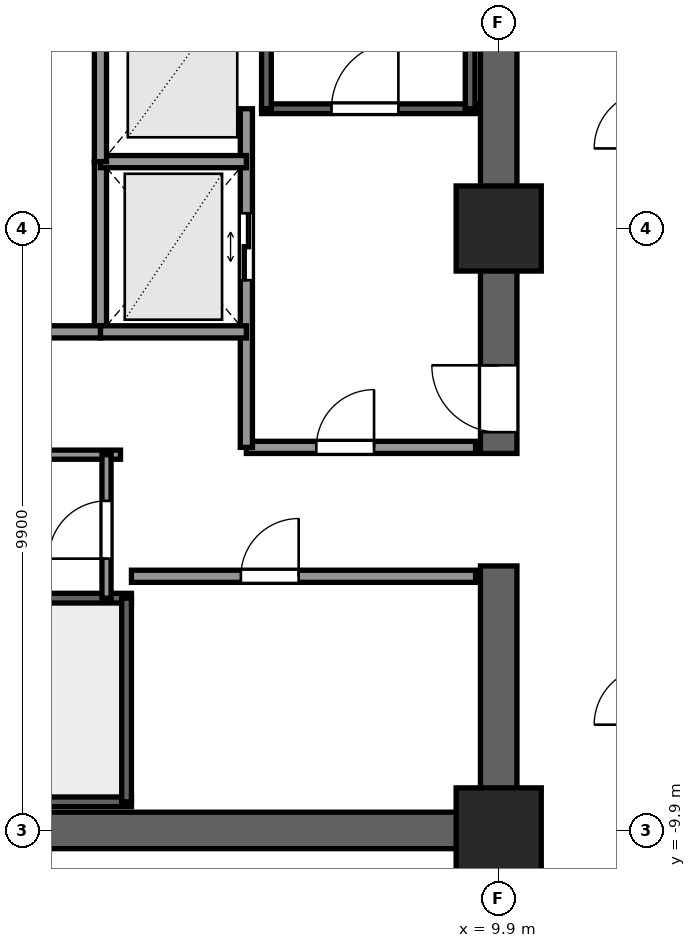
"""IFC4 building model, lengths in metres.
Left out: names, types, materials, properties, quantities, classifications, styles, units other than length and angle.
Written with IfcOpenShell. Run it as: python <this file> out.ifc"""

import sys

from ifc_helpers import new_model, si_unit, direction, frame, frame_2d, origin, origin_2d, place, context, subcontext, project, spatial, rectangle, extrude, element, fill, save


model = new_model("IFC4")
c1 = context("Model", 3, precision=1e-05, world=origin(), true_north=direction((0.0, 1.0)))
c2 = subcontext(c1, "Body", "Model", "MODEL_VIEW")
j1 = project(units=[si_unit("LENGTHUNIT", "METRE"), si_unit("PLANEANGLEUNIT", "RADIAN")], contexts=[c1])
p1 = place(None, origin())
s1 = spatial("IfcSite", under=j1, at=p1, CompositionType="ELEMENT")
p2 = place(p1, origin())
s2 = spatial("IfcBuilding", under=s1, at=p2, CompositionType="ELEMENT")
p3 = place(p2, frame((0.0, 0.0, 23.8)))
s3 = spatial("IfcBuildingStorey", under=s2, at=p3, CompositionType="ELEMENT", Elevation=23.8)
p4 = place(p3, frame((10.2, -9.9, 0.0), z_axis=(0.0, 0.0, 1.0), x_axis=(-1.0, 0.0, 0.0)))
e1 = element("IfcWall", 1, at=p4, inside=s3, PredefinedType="SHEAR", context=c2, shape_type="SweptSolid", body=[
    extrude(rectangle(XDim=12.06, YDim=0.6, at=frame_2d((6.03, 0.0))), origin(), (0.0, 0.0, 1.0), 3.3),
])
p5 = place(p3, frame((9.9, -9.6, 0.0), z_axis=(0.0, 0.0, 1.0), x_axis=(0.0, 1.0, 0.0)))
e2 = element("IfcWall", 2, at=p5, inside=s3, PredefinedType="SHEAR", context=c2, shape_type="SweptSolid", body=[
    extrude(rectangle(XDim=4.05, YDim=0.6, at=frame_2d((2.025, 0.0))), origin(), (0.0, 0.0, 1.0), 3.3),
])
p6 = place(p3, frame((9.9, -3.7, 0.0), z_axis=(0.0, 0.0, 1.0), x_axis=(0.0, 1.0, 0.0)))
e3 = element("IfcWall", 3, at=p6, inside=s3, PredefinedType="SHEAR", context=c2, shape_type="SweptSolid", body=[
    extrude(rectangle(XDim=13.3, YDim=0.6, at=frame_2d((6.65, 0.0))), origin(), (0.0, 0.0, 1.0), 3.3),
])
p7 = place(p6, frame((0.35, 0.0, 0.0)))
e4 = element("IfcOpeningElement", 4, at=p7, cuts=e3, PredefinedType="OPENING", context=c2, shape_type="SweptSolid", body=[
    extrude(rectangle(XDim=1.1, YDim=2.2, at=frame_2d((0.55, 1.1))), frame((0.0, 0.31, 0.0), z_axis=(0.0, -1.0, 0.0), x_axis=(1.0, 0.0, 0.0)), (0.0, 0.0, 1.0), 0.62),
])
for number, where, z_axis, x_axis in (
    (5, (9.9, -9.9, 0.0), (0.0, 0.0, 1.0), (1.0, 0.0, 0.0)),
    (6, (9.9, 0.0, 0.0), (0.0, 0.0, 1.0), (1.0, 0.0, 0.0)),
):
    element("IfcColumn", number, at=place(p3, frame(where, z_axis=z_axis, x_axis=x_axis)), inside=s3, PredefinedType="COLUMN", context=c2, shape_type="SweptSolid", body=[
        extrude(rectangle(XDim=1.4, YDim=1.4, at=origin_2d()), origin(), (0.0, 0.0, 1.0), 3.3),
    ])
p8 = place(p3, frame((6.0, 1.97, 0.0), z_axis=(0.0, 0.0, 1.0), x_axis=(1.0, 0.0, 0.0)))
e7 = element("IfcWall", 7, at=p8, inside=s3, PredefinedType="SHEAR", context=c2, shape_type="SweptSolid", body=[
    extrude(rectangle(XDim=3.52, YDim=0.16, at=frame_2d((1.76, 0.0))), origin(), (0.0, 0.0, 1.0), 3.3),
])
p9 = place(p8, frame((1.15, 0.0, 0.0)))
e8 = element("IfcOpeningElement", 8, at=p9, cuts=e7, PredefinedType="OPENING", context=c2, shape_type="SweptSolid", body=[
    extrude(rectangle(XDim=1.1, YDim=2.2, at=frame_2d((0.55, 1.1))), frame((0.0, 0.09, 0.0), z_axis=(0.0, -1.0, 0.0), x_axis=(1.0, 0.0, 0.0)), (0.0, 0.0, 1.0), 0.18),
])
for number, where, z_axis, x_axis in (
    (9, (6.08, 1.97, 0.0), (0.0, 0.0, 1.0), (0.0, 1.0, 0.0)),
    (10, (9.43, 1.97, 0.0), (0.0, 0.0, 1.0), (0.0, 1.0, 0.0)),
):
    element("IfcWall", number, at=place(p3, frame(where, z_axis=z_axis, x_axis=x_axis)), inside=s3, PredefinedType="SHEAR", context=c2, shape_type="SweptSolid", body=[
        extrude(rectangle(XDim=7.56, YDim=0.16, at=frame_2d((3.78, 0.0))), origin(), (0.0, 0.0, 1.0), 3.3),
    ])
p10 = place(p3, frame((3.86, -9.43, 0.0), z_axis=(0.0, 0.0, 1.0), x_axis=(-1.0, 0.0, 0.0)))
e11 = element("IfcWall", 11, at=p10, inside=s3, PredefinedType="SHEAR", context=c2, shape_type="SweptSolid", body=[
    extrude(rectangle(XDim=7.72, YDim=0.16, at=frame_2d((3.86, 0.0))), origin(), (0.0, 0.0, 1.0), 3.3),
])
p11 = place(p10, frame((6.01, 0.0, 0.0)))
e12 = element("IfcOpeningElement", 12, at=p11, cuts=e11, PredefinedType="OPENING", context=c2, shape_type="SweptSolid", body=[
    extrude(rectangle(XDim=1.1, YDim=2.2, at=frame_2d((0.55, 1.1))), frame((0.0, 0.09, 0.0), z_axis=(0.0, -1.0, 0.0), x_axis=(1.0, 0.0, 0.0)), (0.0, 0.0, 1.0), 0.18),
])
p12 = place(p3, frame((-3.86, -6.08, 0.0), z_axis=(0.0, 0.0, 1.0), x_axis=(1.0, 0.0, 0.0)))
e13 = element("IfcWall", 13, at=p12, inside=s3, PredefinedType="SHEAR", context=c2, shape_type="SweptSolid", body=[
    extrude(rectangle(XDim=7.72, YDim=0.16, at=frame_2d((3.86, 0.0))), origin(), (0.0, 0.0, 1.0), 3.3),
])
p13 = place(p3, frame((3.78, -9.43, 0.0), z_axis=(0.0, 0.0, 1.0), x_axis=(0.0, 1.0, 0.0)))
e14 = element("IfcWall", 14, at=p13, inside=s3, PredefinedType="SHEAR", context=c2, shape_type="SweptSolid", body=[
    extrude(rectangle(XDim=3.35, YDim=0.16, at=frame_2d((1.675, 0.0))), origin(), (0.0, 0.0, 1.0), 3.3),
])
p14 = place(p3, frame((5.75, -3.6, 0.0), z_axis=(0.0, 0.0, 1.0), x_axis=(1.0, 0.0, 0.0)))
e15 = element("IfcWall", 15, at=p14, inside=s3, PredefinedType="SOLIDWALL", context=c2, shape_type="SweptSolid", body=[
    extrude(rectangle(XDim=3.77, YDim=0.2, at=frame_2d((1.885, 0.0))), origin(), (0.0, 0.0, 1.0), 3.06),
])
p15 = place(p14, frame((1.15, 0.0, 0.0)))
e16 = element("IfcOpeningElement", 16, at=p15, cuts=e15, PredefinedType="OPENING", context=c2, shape_type="SweptSolid", body=[
    extrude(rectangle(XDim=0.95, YDim=2.06, at=frame_2d((0.475, 1.03))), frame((0.0, 0.11, 0.0), z_axis=(0.0, -1.0, 0.0), x_axis=(1.0, 0.0, 0.0)), (0.0, 0.0, 1.0), 0.22),
])
p16 = place(p3, frame((5.75, -3.6, 0.0), z_axis=(0.0, 0.0, 1.0), x_axis=(0.0, 1.0, 0.0)))
e17 = element("IfcWall", 17, at=p16, inside=s3, PredefinedType="SOLIDWALL", context=c2, shape_type="SweptSolid", body=[
    extrude(rectangle(XDim=5.57, YDim=0.2, at=frame_2d((2.785, 0.0))), origin(), (0.0, 0.0, 1.0), 3.06),
])
p17 = place(p16, frame((2.75, 0.0, 0.0)))
e18 = element("IfcOpeningElement", 18, at=p17, cuts=e17, PredefinedType="OPENING", context=c2, shape_type="SweptSolid", body=[
    extrude(rectangle(XDim=1.1, YDim=2.2, at=frame_2d((0.55, 1.1))), frame((0.0, 0.11, 0.0), z_axis=(0.0, -1.0, 0.0), x_axis=(1.0, 0.0, 0.0)), (0.0, 0.0, 1.0), 0.22),
])
p18 = place(p3, frame((3.35, -1.7, 0.0), z_axis=(0.0, 0.0, 1.0), x_axis=(0.0, 1.0, 0.0)))
e19 = element("IfcWall", 19, at=p18, inside=s3, PredefinedType="SOLIDWALL", context=c2, shape_type="SweptSolid", body=[
    extrude(rectangle(XDim=2.8, YDim=0.2, at=frame_2d((1.4, 0.0))), origin(), (0.0, 0.0, 1.0), 3.06),
])
for number, where, z_axis, x_axis in (
    (20, (3.35, -1.7, 0.0), (0.0, 0.0, 1.0), (1.0, 0.0, 0.0)),
    (21, (3.35, 1.1, 0.0), (0.0, 0.0, 1.0), (1.0, 0.0, 0.0)),
):
    element("IfcWall", number, at=place(p3, frame(where, z_axis=z_axis, x_axis=x_axis)), inside=s3, PredefinedType="SOLIDWALL", context=c2, shape_type="SweptSolid", body=[
        extrude(rectangle(XDim=2.4, YDim=0.2, at=frame_2d((1.2, 0.0))), origin(), (0.0, 0.0, 1.0), 3.06),
    ])
p19 = place(p3, frame((3.86, -5.72, 0.0), z_axis=(0.0, 0.0, 1.0), x_axis=(1.0, 0.0, 0.0)))
e22 = element("IfcWall", 22, at=p19, inside=s3, PredefinedType="SOLIDWALL", context=c2, shape_type="SweptSolid", body=[
    extrude(rectangle(XDim=5.66, YDim=0.2, at=frame_2d((2.83, 0.0))), origin(), (0.0, 0.0, 1.0), 3.06),
])
p20 = place(p19, frame((1.8, 0.0, 0.0)))
e23 = element("IfcOpeningElement", 23, at=p20, cuts=e22, PredefinedType="OPENING", context=c2, shape_type="SweptSolid", body=[
    extrude(rectangle(XDim=0.95, YDim=2.06, at=frame_2d((0.475, 1.03))), frame((0.0, 0.11, 0.0), z_axis=(0.0, -1.0, 0.0), x_axis=(1.0, 0.0, 0.0)), (0.0, 0.0, 1.0), 0.22),
])
p21 = place(p3, frame((-3.35, -1.7, 0.0), z_axis=(0.0, 0.0, 1.0), x_axis=(1.0, 0.0, 0.0)))
e24 = element("IfcWall", 24, at=p21, inside=s3, PredefinedType="SOLIDWALL", context=c2, shape_type="SweptSolid", body=[
    extrude(rectangle(XDim=6.7, YDim=0.2, at=frame_2d((3.35, 0.0))), origin(), (0.0, 0.0, 1.0), 3.06),
])
p22 = place(p3, frame((3.35, 1.1, 0.0), z_axis=(0.0, 0.0, 1.0), x_axis=(0.0, 1.0, 0.0)))
e25 = element("IfcWall", 25, at=p22, inside=s3, PredefinedType="SOLIDWALL", context=c2, shape_type="SweptSolid", body=[
    extrude(rectangle(XDim=3.2, YDim=0.2, at=frame_2d((1.6, 0.0))), origin(), (0.0, 0.0, 1.0), 3.06),
])
p23 = place(p3, frame((-3.68, -3.72, 0.0), z_axis=(0.0, 0.0, 1.0), x_axis=(1.0, 0.0, 0.0)))
e26 = element("IfcWall", 26, at=p23, inside=s3, PredefinedType="PARTITIONING", context=c2, shape_type="SweptSolid", body=[
    extrude(rectangle(XDim=7.36, YDim=0.15, at=frame_2d((3.68, 0.0))), origin(), (0.0, 0.0, 1.0), 3.06),
])
p24 = place(p3, frame((3.45, -6.08, 0.0), z_axis=(0.0, 0.0, 1.0), x_axis=(0.0, 1.0, 0.0)))
e27 = element("IfcWall", 27, at=p24, inside=s3, PredefinedType="PARTITIONING", context=c2, shape_type="SweptSolid", body=[
    extrude(rectangle(XDim=2.36, YDim=0.15, at=frame_2d((1.18, 0.0))), origin(), (0.0, 0.0, 1.0), 3.06),
])
p25 = place(p24, frame((0.65, 0.0, 0.0)))
e28 = element("IfcOpeningElement", 28, at=p25, cuts=e27, PredefinedType="OPENING", context=c2, shape_type="SweptSolid", body=[
    extrude(rectangle(XDim=0.95, YDim=2.06, at=frame_2d((0.475, 1.03))), frame((0.0, 0.085, 0.0), z_axis=(0.0, -1.0, 0.0), x_axis=(1.0, 0.0, 0.0)), (0.0, 0.0, 1.0), 0.17),
])
p26 = place(p9, origin())
e29 = element("IfcDoor", 29, at=p26, inside=s3, OperationType="SINGLE_SWING_RIGHT", PredefinedType="DOOR", context=c2, shape_type="SweptSolid", body=[
    extrude(rectangle(XDim=1.1, YDim=2.2, at=frame_2d((0.55, 1.1))), frame((0.0, 0.025, 0.0), z_axis=(0.0, -1.0, 0.0), x_axis=(1.0, 0.0, 0.0)), (0.0, 0.0, 1.0), 0.05),
])
fill(e8, e29)
p27 = place(p7, origin())
e30 = element("IfcDoor", 30, at=p27, inside=s3, OperationType="SINGLE_SWING_RIGHT", PredefinedType="DOOR", context=c2, shape_type="SweptSolid", body=[
    extrude(rectangle(XDim=1.1, YDim=2.2, at=frame_2d((0.55, 1.1))), frame((0.0, 0.025, 0.0), z_axis=(0.0, -1.0, 0.0), x_axis=(1.0, 0.0, 0.0)), (0.0, 0.0, 1.0), 0.05),
])
fill(e4, e30)
p28 = place(p17, origin())
e31 = element("IfcDoor", 31, at=p28, inside=s3, OperationType="DOUBLE_DOOR_SLIDING", PredefinedType="DOOR", context=c2, shape_type="SweptSolid", body=[
    extrude(rectangle(XDim=1.1, YDim=2.2, at=frame_2d((0.55, 1.1))), frame((0.0, 0.025, 0.0), z_axis=(0.0, -1.0, 0.0), x_axis=(1.0, 0.0, 0.0)), (0.0, 0.0, 1.0), 0.05),
])
fill(e18, e31)
p29 = place(p20, origin())
e32 = element("IfcDoor", 32, at=p29, inside=s3, OperationType="SINGLE_SWING_RIGHT", PredefinedType="DOOR", context=c2, shape_type="SweptSolid", body=[
    extrude(rectangle(XDim=0.95, YDim=2.06, at=frame_2d((0.475, 1.03))), frame((0.0, 0.025, 0.0), z_axis=(0.0, -1.0, 0.0), x_axis=(1.0, 0.0, 0.0)), (0.0, 0.0, 1.0), 0.05),
])
fill(e23, e32)
p30 = place(p15, origin())
e33 = element("IfcDoor", 33, at=p30, inside=s3, OperationType="SINGLE_SWING_RIGHT", PredefinedType="DOOR", context=c2, shape_type="SweptSolid", body=[
    extrude(rectangle(XDim=0.95, YDim=2.06, at=frame_2d((0.475, 1.03))), frame((0.0, 0.025, 0.0), z_axis=(0.0, -1.0, 0.0), x_axis=(1.0, 0.0, 0.0)), (0.0, 0.0, 1.0), 0.05),
])
fill(e16, e33)
p31 = place(p25, origin())
e34 = element("IfcDoor", 34, at=p31, inside=s3, OperationType="SINGLE_SWING_LEFT", PredefinedType="DOOR", context=c2, shape_type="SweptSolid", body=[
    extrude(rectangle(XDim=0.95, YDim=2.06, at=frame_2d((0.475, 1.03))), frame((0.0, 0.025, 0.0), z_axis=(0.0, -1.0, 0.0), x_axis=(1.0, 0.0, 0.0)), (0.0, 0.0, 1.0), 0.05),
])
fill(e28, e34)
save(model, sys.argv[1])
